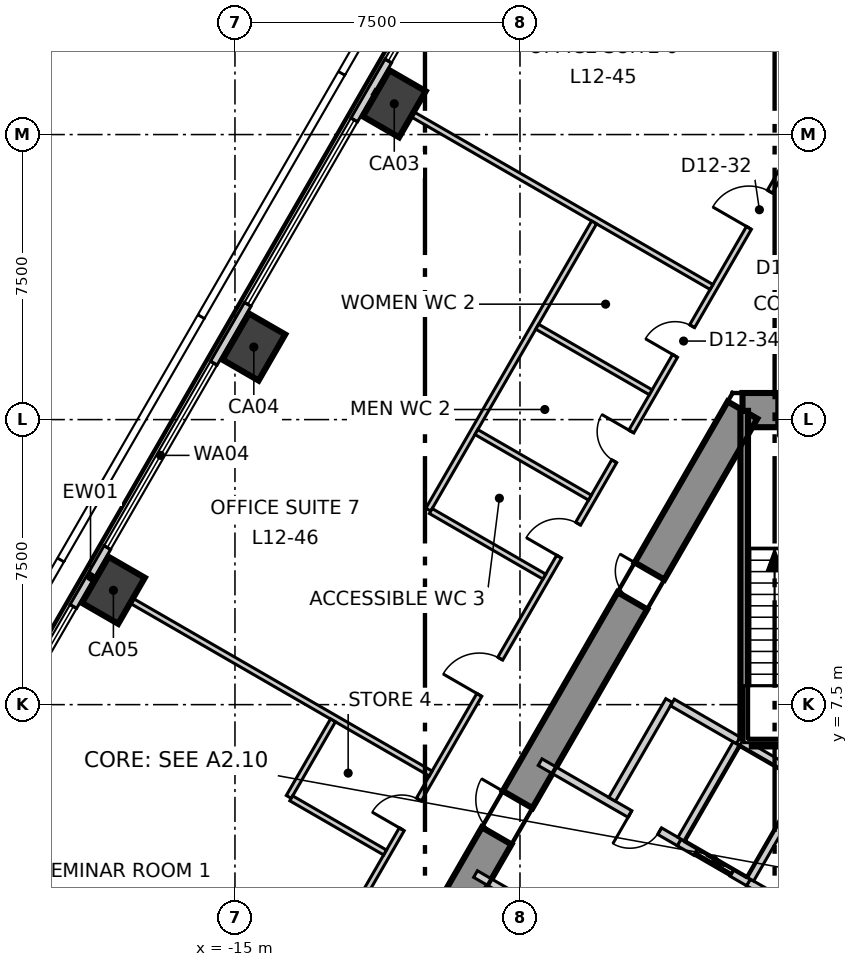
"""IFC4 building model, lengths in metres.
Left out: names, types, materials, properties, quantities, classifications, styles, units other than length and angle.
Written with IfcOpenShell. Run it as: python <this file> out.ifc"""

import sys

from ifc_helpers import new_model, si_unit, direction, frame, frame_2d, origin, origin_2d, place, context, subcontext, project, spatial, polyline, rectangle, outline, extrude, element, fill, save


model = new_model("IFC4")
c1 = context("Model", 3, precision=1e-05, world=origin(), true_north=direction((0.0, 1.0)))
c2 = subcontext(c1, "Body", "Model", "MODEL_VIEW")
j1 = project(units=[si_unit("LENGTHUNIT", "METRE"), si_unit("PLANEANGLEUNIT", "RADIAN")], contexts=[c1])
p1 = place(None, origin())
s1 = spatial("IfcSite", under=j1, at=p1, CompositionType="ELEMENT")
p2 = place(p1, origin())
s2 = spatial("IfcBuilding", under=s1, at=p2, CompositionType="ELEMENT")
p3 = place(p2, frame((0.0, 0.0, 59.3)))
s3 = spatial("IfcBuildingStorey", under=s2, at=p3, CompositionType="ELEMENT", Elevation=59.3)
p4 = place(p3, frame((1.645, 15.25, -0.3), z_axis=(0.0, 0.0, 1.0), x_axis=(-1.0, 0.0, 0.0)))
e1 = element("IfcWall", 1, at=p4, inside=s3, PredefinedType="SHEAR", context=c2, shape_type="SweptSolid", body=[
    extrude(outline(polyline([(-0.26, -0.45), (1.645, -0.45), (3.55, -0.45), (3.031, 0.45), (1.645, 0.45), (0.259, 0.45), (-0.26, -0.45)])), origin(), (0.0, 0.0, 1.0), 4.0),
])
p5 = place(p4, frame((0.945, 0.0, 0.3)))
e2 = element("IfcOpeningElement", 2, at=p5, cuts=e1, PredefinedType="OPENING", context=c2, shape_type="SweptSolid", body=[
    extrude(rectangle(XDim=1.4, YDim=2.1, at=frame_2d((0.7, 1.05))), frame((0.0, 0.46, 0.0), z_axis=(0.0, -1.0, 0.0), x_axis=(1.0, 0.0, 0.0)), (0.0, 0.0, 1.0), 0.92),
])
p6 = place(p3, frame((-1.645, 15.25, -0.3), z_axis=(0.0, 0.0, 1.0), x_axis=(-0.500026485275, -0.866010111964, 0.0)))
e3 = element("IfcWall", 3, at=p6, inside=s3, PredefinedType="SHEAR", context=c2, shape_type="SweptSolid", body=[
    extrude(outline(polyline([(-0.26, -0.45), (1.685, -0.45), (3.63, -0.45), (5.576, -0.45), (7.521, -0.45), (9.466, -0.449), (11.411, -0.449), (13.357, -0.449), (15.302, -0.449), (17.247, -0.449), (19.192, -0.449), (21.138, -0.449), (23.083, -0.449), (25.028, -0.449), (24.509, 0.45), (22.644, 0.45), (20.778, 0.45), (18.913, 0.45), (17.048, 0.45), (15.182, 0.449), (13.317, 0.449), (11.452, 0.449), (9.587, 0.449), (7.721, 0.449), (5.856, 0.449), (3.991, 0.449), (2.125, 0.449), (0.26, 0.449), (-0.26, -0.45)])), origin(), (0.0, 0.0, 1.0), 4.0),
])
p7 = place(p6, frame((11.834, 0.0, 0.3)))
e4 = element("IfcOpeningElement", 4, at=p7, cuts=e3, PredefinedType="OPENING", context=c2, shape_type="SweptSolid", body=[
    extrude(rectangle(XDim=1.1, YDim=2.1, at=frame_2d((0.55, 1.05))), frame((0.0, 0.46, 0.0), z_axis=(0.0, -1.0, 0.0), x_axis=(1.0, 0.0, 0.0)), (0.0, 0.0, 1.0), 0.92),
])
p8 = place(p6, frame((18.976, 0.0, 0.3)))
e5 = element("IfcOpeningElement", 5, at=p8, cuts=e3, PredefinedType="OPENING", context=c2, shape_type="SweptSolid", body=[
    extrude(rectangle(XDim=0.9, YDim=2.1, at=frame_2d((0.45, 1.05))), frame((0.0, 0.46, 0.0), z_axis=(0.0, -1.0, 0.0), x_axis=(1.0, 0.0, 0.0)), (0.0, 0.0, 1.0), 0.92),
])
p9 = place(p6, frame((4.892, 0.0, 0.3)))
e6 = element("IfcOpeningElement", 6, at=p9, cuts=e3, PredefinedType="OPENING", context=c2, shape_type="SweptSolid", body=[
    extrude(rectangle(XDim=0.9, YDim=2.1, at=frame_2d((0.45, 1.05))), frame((0.0, 0.46, 0.0), z_axis=(0.0, -1.0, 0.0), x_axis=(1.0, 0.0, 0.0)), (0.0, 0.0, 1.0), 0.92),
])
for number, where, z_axis, x_axis in (
    (7, (-10.808, 23.31, -0.3), (0.0, 0.0, 1.0), (0.5, 0.866, 0.0)),
    (8, (-14.504, 16.909, -0.3), (0.0, 0.0, 1.0), (0.5, 0.866, 0.0)),
    (9, (-18.199, 10.508, -0.3), (0.0, 0.0, 1.0), (0.5, 0.866, 0.0)),
):
    element("IfcColumn", number, at=place(p3, frame(where, z_axis=z_axis, x_axis=x_axis)), inside=s3, PredefinedType="COLUMN", context=c2, shape_type="SweptSolid", body=[
        extrude(rectangle(XDim=1.4, YDim=1.1, at=origin_2d()), origin(), (0.0, 0.0, 1.0), 4.0),
    ])
p10 = place(p3, frame((-3.371, 37.591, 0.0), z_axis=(0.0, 0.0, 1.0), x_axis=(-0.500006313899, -0.866021758423, 0.0)))
e10 = element("IfcWall", 10, at=p10, inside=s3, PredefinedType="ELEMENTEDWALL", context=c2, shape_type="SweptSolid", body=[
    extrude(rectangle(XDim=61.719, YDim=0.2, at=frame_2d((30.859, 0.0))), origin(), (0.0, 0.0, 1.0), 3.7),
])
p11 = place(p10, frame((2.198, 0.0, 0.9)))
e11 = element("IfcOpeningElement", 11, at=p11, cuts=e10, PredefinedType="OPENING", context=c2, shape_type="SweptSolid", body=[
    extrude(rectangle(XDim=5.6, YDim=2.5, at=frame_2d((2.8, 1.25))), frame((0.0, 0.11, 0.0), z_axis=(0.0, -1.0, 0.0), x_axis=(1.0, 0.0, 0.0)), (0.0, 0.0, 1.0), 0.22),
])
p12 = place(p10, frame((9.59, 0.0, 0.9)))
e12 = element("IfcOpeningElement", 12, at=p12, cuts=e10, PredefinedType="OPENING", context=c2, shape_type="SweptSolid", body=[
    extrude(rectangle(XDim=5.6, YDim=2.5, at=frame_2d((2.8, 1.25))), frame((0.0, 0.11, 0.0), z_axis=(0.0, -1.0, 0.0), x_axis=(1.0, 0.0, 0.0)), (0.0, 0.0, 1.0), 0.22),
])
p13 = place(p10, frame((16.982, 0.0, 0.9)))
e13 = element("IfcOpeningElement", 13, at=p13, cuts=e10, PredefinedType="OPENING", context=c2, shape_type="SweptSolid", body=[
    extrude(rectangle(XDim=5.6, YDim=2.5, at=frame_2d((2.8, 1.25))), frame((0.0, 0.11, 0.0), z_axis=(0.0, -1.0, 0.0), x_axis=(1.0, 0.0, 0.0)), (0.0, 0.0, 1.0), 0.22),
])
p14 = place(p10, frame((24.373, 0.0, 0.9)))
e14 = element("IfcOpeningElement", 14, at=p14, cuts=e10, PredefinedType="OPENING", context=c2, shape_type="SweptSolid", body=[
    extrude(rectangle(XDim=5.6, YDim=2.5, at=frame_2d((2.8, 1.25))), frame((0.0, 0.11, 0.0), z_axis=(0.0, -1.0, 0.0), x_axis=(1.0, 0.0, 0.0)), (0.0, 0.0, 1.0), 0.22),
])
p15 = place(p10, frame((31.765, 0.0, 0.9)))
e15 = element("IfcOpeningElement", 15, at=p15, cuts=e10, PredefinedType="OPENING", context=c2, shape_type="SweptSolid", body=[
    extrude(rectangle(XDim=5.6, YDim=2.5, at=frame_2d((2.8, 1.25))), frame((0.0, 0.11, 0.0), z_axis=(0.0, -1.0, 0.0), x_axis=(1.0, 0.0, 0.0)), (0.0, 0.0, 1.0), 0.22),
])
p16 = place(p10, frame((39.157, 0.0, 0.9)))
e16 = element("IfcOpeningElement", 16, at=p16, cuts=e10, PredefinedType="OPENING", context=c2, shape_type="SweptSolid", body=[
    extrude(rectangle(XDim=5.6, YDim=2.5, at=frame_2d((2.8, 1.25))), frame((0.0, 0.11, 0.0), z_axis=(0.0, -1.0, 0.0), x_axis=(1.0, 0.0, 0.0)), (0.0, 0.0, 1.0), 0.22),
])
p17 = place(p10, frame((46.548, 0.0, 0.9)))
e17 = element("IfcOpeningElement", 17, at=p17, cuts=e10, PredefinedType="OPENING", context=c2, shape_type="SweptSolid", body=[
    extrude(rectangle(XDim=5.6, YDim=2.5, at=frame_2d((2.8, 1.25))), frame((0.0, 0.11, 0.0), z_axis=(0.0, -1.0, 0.0), x_axis=(1.0, 0.0, 0.0)), (0.0, 0.0, 1.0), 0.22),
])
p18 = place(p10, frame((53.94, 0.0, 0.9)))
e18 = element("IfcOpeningElement", 18, at=p18, cuts=e10, PredefinedType="OPENING", context=c2, shape_type="SweptSolid", body=[
    extrude(rectangle(XDim=5.6, YDim=2.5, at=frame_2d((2.8, 1.25))), frame((0.0, 0.11, 0.0), z_axis=(0.0, -1.0, 0.0), x_axis=(1.0, 0.0, 0.0)), (0.0, 0.0, 1.0), 0.22),
])
p19 = place(p3, frame((-19.497, -11.17, 0.0), z_axis=(0.0, 0.0, 1.0), x_axis=(0.499998854553, 0.866026065108, 0.0)))
e19 = element("IfcWall", 19, at=p19, inside=s3, PredefinedType="PARTITIONING", context=c2, shape_type="SweptSolid", body=[
    extrude(rectangle(XDim=38.994, YDim=0.15, at=frame_2d((19.497, 0.0))), origin(), (0.0, 0.0, 1.0), 3.7),
])
p20 = place(p19, frame((36.044, 0.0, 0.0)))
e20 = element("IfcOpeningElement", 20, at=p20, cuts=e19, PredefinedType="OPENING", context=c2, shape_type="SweptSolid", body=[
    extrude(rectangle(XDim=1.1, YDim=2.1, at=frame_2d((0.55, 1.05))), frame((0.0, 0.085, 0.0), z_axis=(0.0, -1.0, 0.0), x_axis=(1.0, 0.0, 0.0)), (0.0, 0.0, 1.0), 0.17),
])
p21 = place(p19, frame((21.855, 0.0, 0.0)))
e21 = element("IfcOpeningElement", 21, at=p21, cuts=e19, PredefinedType="OPENING", context=c2, shape_type="SweptSolid", body=[
    extrude(rectangle(XDim=1.1, YDim=2.1, at=frame_2d((0.55, 1.05))), frame((0.0, 0.085, 0.0), z_axis=(0.0, -1.0, 0.0), x_axis=(1.0, 0.0, 0.0)), (0.0, 0.0, 1.0), 0.17),
])
p22 = place(p19, frame((32.155, 0.0, 0.0)))
e22 = element("IfcOpeningElement", 22, at=p22, cuts=e19, PredefinedType="OPENING", context=c2, shape_type="SweptSolid", body=[
    extrude(rectangle(XDim=0.9, YDim=2.1, at=frame_2d((0.45, 1.05))), frame((0.0, 0.085, 0.0), z_axis=(0.0, -1.0, 0.0), x_axis=(1.0, 0.0, 0.0)), (0.0, 0.0, 1.0), 0.17),
])
p23 = place(p19, frame((28.955, 0.0, 0.0)))
e23 = element("IfcOpeningElement", 23, at=p23, cuts=e19, PredefinedType="OPENING", context=c2, shape_type="SweptSolid", body=[
    extrude(rectangle(XDim=0.9, YDim=2.1, at=frame_2d((0.45, 1.05))), frame((0.0, 0.085, 0.0), z_axis=(0.0, -1.0, 0.0), x_axis=(1.0, 0.0, 0.0)), (0.0, 0.0, 1.0), 0.17),
])
p24 = place(p19, frame((26.055, 0.0, 0.0)))
e24 = element("IfcOpeningElement", 24, at=p24, cuts=e19, PredefinedType="OPENING", context=c2, shape_type="SweptSolid", body=[
    extrude(rectangle(XDim=1.0, YDim=2.1, at=frame_2d((0.5, 1.05))), frame((0.0, 0.085, 0.0), z_axis=(0.0, -1.0, 0.0), x_axis=(1.0, 0.0, 0.0)), (0.0, 0.0, 1.0), 0.17),
])
p25 = place(p19, frame((10.373, 0.0, 0.0)))
e25 = element("IfcOpeningElement", 25, at=p25, cuts=e19, PredefinedType="OPENING", context=c2, shape_type="SweptSolid", body=[
    extrude(rectangle(XDim=1.0, YDim=2.1, at=frame_2d((0.5, 1.05))), frame((0.0, 0.085, 0.0), z_axis=(0.0, -1.0, 0.0), x_axis=(1.0, 0.0, 0.0)), (0.0, 0.0, 1.0), 0.17),
])
p26 = place(p19, frame((17.773, 0.0, 0.0)))
e26 = element("IfcOpeningElement", 26, at=p26, cuts=e19, PredefinedType="OPENING", context=c2, shape_type="SweptSolid", body=[
    extrude(rectangle(XDim=0.9, YDim=2.1, at=frame_2d((0.45, 1.05))), frame((0.0, 0.085, 0.0), z_axis=(0.0, -1.0, 0.0), x_axis=(1.0, 0.0, 0.0)), (0.0, 0.0, 1.0), 0.17),
])
p27 = place(p19, frame((1.689, 0.0, 0.0)))
e27 = element("IfcOpeningElement", 27, at=p27, cuts=e19, PredefinedType="OPENING", context=c2, shape_type="SweptSolid", body=[
    extrude(rectangle(XDim=1.1, YDim=2.1, at=frame_2d((0.55, 1.05))), frame((0.0, 0.085, 0.0), z_axis=(0.0, -1.0, 0.0), x_axis=(1.0, 0.0, 0.0)), (0.0, 0.0, 1.0), 0.17),
])
p28 = place(p3, frame((-18.736, 10.818, 0.0), z_axis=(0.0, 0.0, 1.0), x_axis=(0.866010033384, -0.500026621369, 0.0)))
e28 = element("IfcWall", 28, at=p28, inside=s3, PredefinedType="PARTITIONING", context=c2, shape_type="SweptSolid", body=[
    extrude(rectangle(XDim=10.26, YDim=0.15, at=frame_2d((5.13, 0.0))), origin(), (0.0, 0.0, 1.0), 3.2),
])
p29 = place(p3, frame((-13.584, 5.072, 0.0), z_axis=(0.0, 0.0, 1.0), x_axis=(0.500113184874, 0.865960046605, 0.0)))
e29 = element("IfcWall", 29, at=p29, inside=s3, PredefinedType="PARTITIONING", context=c2, shape_type="SweptSolid", body=[
    extrude(rectangle(XDim=2.326, YDim=0.15, at=frame_2d((1.163, 0.0))), origin(), (0.0, 0.0, 1.0), 3.7),
])
p30 = place(p3, frame((-13.519, 5.035, 0.0), z_axis=(0.0, 0.0, 1.0), x_axis=(0.866041498374, -0.499972122318, 0.0)))
e30 = element("IfcWall", 30, at=p30, inside=s3, PredefinedType="PARTITIONING", context=c2, shape_type="SweptSolid", body=[
    extrude(rectangle(XDim=2.85, YDim=0.15, at=frame_2d((1.425, 0.0))), origin(), (0.0, 0.0, 1.0), 3.7),
])
p31 = place(p3, frame((-11.345, 23.62, 0.0), z_axis=(0.0, 0.0, 1.0), x_axis=(0.866010033384, -0.500026621369, 0.0)))
e31 = element("IfcWall", 31, at=p31, inside=s3, PredefinedType="PARTITIONING", context=c2, shape_type="SweptSolid", body=[
    extrude(rectangle(XDim=10.26, YDim=0.15, at=frame_2d((5.13, 0.0))), origin(), (0.0, 0.0, 1.0), 3.7),
])
p32 = place(p3, frame((-9.912, 12.631, 0.0), z_axis=(0.0, 0.0, 1.0), x_axis=(0.49992187278, 0.866070505857, 0.0)))
e32 = element("IfcWall", 32, at=p32, inside=s3, PredefinedType="PARTITIONING", context=c2, shape_type="SweptSolid", body=[
    extrude(rectangle(XDim=8.726, YDim=0.15, at=frame_2d((4.363, 0.0))), origin(), (0.0, 0.0, 1.0), 3.7),
])
p33 = place(p3, frame((-9.847, 12.594, 0.0), z_axis=(0.0, 0.0, 1.0), x_axis=(0.865942736565, -0.500143156496, 0.0)))
e33 = element("IfcWall", 33, at=p33, inside=s3, PredefinedType="PARTITIONING", context=c2, shape_type="SweptSolid", body=[
    extrude(rectangle(XDim=3.449, YDim=0.15, at=frame_2d((1.725, 0.0))), origin(), (0.0, 0.0, 1.0), 3.7),
])
for number, where, z_axis, x_axis in (
    (34, (-8.647, 14.672, 0.0), (0.0, 0.0, 1.0), (0.866, -0.5, 0.0)),
    (35, (-7.047, 17.444, 0.0), (0.0, 0.0, 1.0), (0.866, -0.5, 0.0)),
):
    element("IfcWall", number, at=place(p3, frame(where, z_axis=z_axis, x_axis=x_axis)), inside=s3, PredefinedType="PARTITIONING", context=c2, shape_type="SweptSolid", body=[
        extrude(rectangle(XDim=3.449, YDim=0.15, at=frame_2d((1.725, 0.0))), origin(), (0.0, 0.0, 1.0), 3.7),
    ])
p34 = place(p3, frame((-8.67, 3.043, 0.0), z_axis=(0.0, 0.0, 1.0), x_axis=(0.866029956157, -0.499992114976, 0.0)))
e36 = element("IfcWall", 36, at=p34, inside=s3, PredefinedType="SOLIDWALL", context=c2, shape_type="SweptSolid", body=[
    extrude(rectangle(XDim=4.232, YDim=0.2, at=frame_2d((2.116, 0.0))), origin(), (0.0, 0.0, 1.0), 3.7),
])
p35 = place(p34, frame((2.63, 0.0, 0.0)))
e37 = element("IfcOpeningElement", 37, at=p35, cuts=e36, PredefinedType="OPENING", context=c2, shape_type="SweptSolid", body=[
    extrude(rectangle(XDim=1.1, YDim=2.1, at=frame_2d((0.55, 1.05))), frame((0.0, 0.11, 0.0), z_axis=(0.0, -1.0, 0.0), x_axis=(1.0, 0.0, 0.0)), (0.0, 0.0, 1.0), 0.22),
])
p36 = place(p3, frame((-6.97, 5.987, 0.0), z_axis=(0.0, 0.0, 1.0), x_axis=(0.866029956157, -0.499992114976, 0.0)))
e38 = element("IfcWall", 38, at=p36, inside=s3, PredefinedType="SOLIDWALL", context=c2, shape_type="SweptSolid", body=[
    extrude(rectangle(XDim=4.232, YDim=0.2, at=frame_2d((2.116, 0.0))), origin(), (0.0, 0.0, 1.0), 3.7),
])
p37 = place(p36, frame((2.73, 0.0, 0.0)))
e39 = element("IfcOpeningElement", 39, at=p37, cuts=e38, PredefinedType="OPENING", context=c2, shape_type="SweptSolid", body=[
    extrude(rectangle(XDim=0.9, YDim=2.1, at=frame_2d((0.45, 1.05))), frame((0.0, 0.11, 0.0), z_axis=(0.0, -1.0, 0.0), x_axis=(1.0, 0.0, 0.0)), (0.0, 0.0, 1.0), 0.22),
])
p38 = place(p3, frame((-1.488, 2.822, 0.0), z_axis=(0.0, 0.0, 1.0), x_axis=(0.866236612152, -0.499633997809, 0.0)))
e40 = element("IfcWall", 40, at=p38, inside=s3, PredefinedType="SOLIDWALL", context=c2, shape_type="SweptSolid", body=[
    extrude(rectangle(XDim=0.796, YDim=0.2, at=frame_2d((0.398, 0.0))), origin(), (0.0, 0.0, 1.0), 3.7),
])
p39 = place(p3, frame((-5.076, 5.009, 0.0), z_axis=(0.0, 0.0, 1.0), x_axis=(0.50002537861, 0.866010750942, 0.0)))
e41 = element("IfcWall", 41, at=p39, inside=s3, PredefinedType="SOLIDWALL", context=c2, shape_type="SweptSolid", body=[
    extrude(rectangle(XDim=3.0, YDim=0.2, at=frame_2d((1.5, 0.0))), origin(), (0.0, 0.0, 1.0), 3.7),
])
p40 = place(p3, frame((-3.489, 7.557, 0.0), z_axis=(0.0, 0.0, 1.0), x_axis=(0.866010750942, -0.50002537861, 0.0)))
e42 = element("IfcWall", 42, at=p40, inside=s3, PredefinedType="SOLIDWALL", context=c2, shape_type="SweptSolid", body=[
    extrude(rectangle(XDim=2.0, YDim=0.2, at=frame_2d((1.0, 0.0))), origin(), (0.0, 0.0, 1.0), 3.7),
])
p41 = place(p3, frame((-3.309, 3.873, 0.0), z_axis=(0.0, 0.0, 1.0), x_axis=(0.866098583652, -0.499873227325, 0.0)))
e43 = element("IfcWall", 43, at=p41, inside=s3, PredefinedType="SOLIDWALL", context=c2, shape_type="SweptSolid", body=[
    extrude(rectangle(XDim=2.103, YDim=0.2, at=frame_2d((1.051, 0.0))), origin(), (0.0, 0.0, 1.0), 3.7),
])
p42 = place(p41, frame((0.502, 0.0, 0.0)))
e44 = element("IfcOpeningElement", 44, at=p42, cuts=e43, PredefinedType="OPENING", context=c2, shape_type="SweptSolid", body=[
    extrude(rectangle(XDim=1.1, YDim=2.1, at=frame_2d((0.55, 1.05))), frame((0.0, 0.11, 0.0), z_axis=(0.0, -1.0, 0.0), x_axis=(1.0, 0.0, 0.0)), (0.0, 0.0, 1.0), 0.22),
])
p43 = place(p3, frame((-3.257, 3.959, 0.0), z_axis=(0.0, 0.0, 1.0), x_axis=(0.50012328804, 0.865954211699, 0.0)))
e45 = element("IfcWall", 45, at=p43, inside=s3, PredefinedType="SOLIDWALL", context=c2, shape_type="SweptSolid", body=[
    extrude(rectangle(XDim=2.9, YDim=0.2, at=frame_2d((1.45, 0.0))), origin(), (0.0, 0.0, 1.0), 3.7),
])
p44 = place(p3, frame((-1.67, 6.507, 0.0), z_axis=(0.0, 0.0, 1.0), x_axis=(0.865941441609, -0.500145398563, 0.0)))
e46 = element("IfcWall", 46, at=p44, inside=s3, PredefinedType="SOLIDWALL", context=c2, shape_type="SweptSolid", body=[
    extrude(rectangle(XDim=1.815, YDim=0.2, at=frame_2d((0.908, 0.0))), origin(), (0.0, 0.0, 1.0), 3.7),
])
p45 = place(p3, frame((-1.438, 2.909, 0.0), z_axis=(0.0, 0.0, 1.0), x_axis=(0.499829630636, 0.866123744241, 0.0)))
e47 = element("IfcWall", 47, at=p45, inside=s3, PredefinedType="SOLIDWALL", context=c2, shape_type="SweptSolid", body=[
    extrude(rectangle(XDim=2.761, YDim=0.2, at=frame_2d((1.38, 0.0))), origin(), (0.0, 0.0, 1.0), 3.7),
])
p46 = place(p3, frame((-1.4, 6.5, 0.0), z_axis=(0.0, 0.0, 1.0), x_axis=(1.0, 0.0, 0.0)))
e48 = element("IfcWall", 48, at=p46, inside=s3, PredefinedType="SOLIDWALL", context=c2, shape_type="SweptSolid", body=[
    extrude(rectangle(XDim=2.8, YDim=0.2, at=frame_2d((1.4, 0.0))), origin(), (0.0, 0.0, 1.0), 3.7),
])
p47 = place(p3, frame((-1.6, 6.615, 0.0), z_axis=(0.0, 0.0, 1.0), x_axis=(0.0, 1.0, 0.0)))
e49 = element("IfcWall", 49, at=p47, inside=s3, PredefinedType="SOLIDWALL", context=c2, shape_type="SweptSolid", body=[
    extrude(rectangle(XDim=8.615, YDim=0.2, at=frame_2d((4.308, 0.0))), origin(), (0.0, 0.0, 1.0), 3.7),
])
p48 = place(p12, origin())
e50 = element("IfcWindow", 50, at=p48, inside=s3, PartitioningType="SINGLE_PANEL", PredefinedType="WINDOW", context=c2, shape_type="SweptSolid", body=[
    extrude(rectangle(XDim=5.6, YDim=2.5, at=frame_2d((2.8, 1.25))), frame((0.0, 0.03, 0.0), z_axis=(0.0, -1.0, 0.0), x_axis=(1.0, 0.0, 0.0)), (0.0, 0.0, 1.0), 0.06),
])
fill(e12, e50)
p49 = place(p13, origin())
e51 = element("IfcWindow", 51, at=p49, inside=s3, PartitioningType="SINGLE_PANEL", PredefinedType="WINDOW", context=c2, shape_type="SweptSolid", body=[
    extrude(rectangle(XDim=5.6, YDim=2.5, at=frame_2d((2.8, 1.25))), frame((0.0, 0.03, 0.0), z_axis=(0.0, -1.0, 0.0), x_axis=(1.0, 0.0, 0.0)), (0.0, 0.0, 1.0), 0.06),
])
fill(e13, e51)
p50 = place(p14, origin())
e52 = element("IfcWindow", 52, at=p50, inside=s3, PartitioningType="SINGLE_PANEL", PredefinedType="WINDOW", context=c2, shape_type="SweptSolid", body=[
    extrude(rectangle(XDim=5.6, YDim=2.5, at=frame_2d((2.8, 1.25))), frame((0.0, 0.03, 0.0), z_axis=(0.0, -1.0, 0.0), x_axis=(1.0, 0.0, 0.0)), (0.0, 0.0, 1.0), 0.06),
])
fill(e14, e52)
p51 = place(p15, origin())
e53 = element("IfcWindow", 53, at=p51, inside=s3, PartitioningType="SINGLE_PANEL", PredefinedType="WINDOW", context=c2, shape_type="SweptSolid", body=[
    extrude(rectangle(XDim=5.6, YDim=2.5, at=frame_2d((2.8, 1.25))), frame((0.0, 0.03, 0.0), z_axis=(0.0, -1.0, 0.0), x_axis=(1.0, 0.0, 0.0)), (0.0, 0.0, 1.0), 0.06),
])
fill(e15, e53)
p52 = place(p42, origin())
e54 = element("IfcDoor", 54, at=p52, inside=s3, OperationType="SLIDING_TO_LEFT", PredefinedType="DOOR", context=c2, shape_type="SweptSolid", body=[
    extrude(rectangle(XDim=1.1, YDim=2.1, at=frame_2d((0.55, 1.05))), frame((0.0, 0.025, 0.0), z_axis=(0.0, -1.0, 0.0), x_axis=(1.0, 0.0, 0.0)), (0.0, 0.0, 1.0), 0.05),
])
fill(e44, e54)
p53 = place(p37, origin())
e55 = element("IfcDoor", 55, at=p53, inside=s3, OperationType="SINGLE_SWING_LEFT", PredefinedType="DOOR", context=c2, shape_type="SweptSolid", body=[
    extrude(rectangle(XDim=0.9, YDim=2.1, at=frame_2d((0.45, 1.05))), frame((0.0, 0.025, 0.0), z_axis=(0.0, -1.0, 0.0), x_axis=(1.0, 0.0, 0.0)), (0.0, 0.0, 1.0), 0.05),
])
fill(e39, e55)
p54 = place(p20, origin())
e56 = element("IfcDoor", 56, at=p54, inside=s3, OperationType="SINGLE_SWING_RIGHT", PredefinedType="DOOR", context=c2, shape_type="SweptSolid", body=[
    extrude(rectangle(XDim=1.1, YDim=2.1, at=frame_2d((0.55, 1.05))), frame((0.0, 0.025, 0.0), z_axis=(0.0, -1.0, 0.0), x_axis=(1.0, 0.0, 0.0)), (0.0, 0.0, 1.0), 0.05),
])
fill(e20, e56)
p55 = place(p21, origin())
e57 = element("IfcDoor", 57, at=p55, inside=s3, OperationType="SINGLE_SWING_RIGHT", PredefinedType="DOOR", context=c2, shape_type="SweptSolid", body=[
    extrude(rectangle(XDim=1.1, YDim=2.1, at=frame_2d((0.55, 1.05))), frame((0.0, 0.025, 0.0), z_axis=(0.0, -1.0, 0.0), x_axis=(1.0, 0.0, 0.0)), (0.0, 0.0, 1.0), 0.05),
])
fill(e21, e57)
p56 = place(p22, origin())
e58 = element("IfcDoor", 58, at=p56, inside=s3, OperationType="SINGLE_SWING_RIGHT", PredefinedType="DOOR", context=c2, shape_type="SweptSolid", body=[
    extrude(rectangle(XDim=0.9, YDim=2.1, at=frame_2d((0.45, 1.05))), frame((0.0, 0.025, 0.0), z_axis=(0.0, -1.0, 0.0), x_axis=(1.0, 0.0, 0.0)), (0.0, 0.0, 1.0), 0.05),
])
fill(e22, e58)
p57 = place(p23, origin())
e59 = element("IfcDoor", 59, at=p57, inside=s3, OperationType="SINGLE_SWING_LEFT", PredefinedType="DOOR", context=c2, shape_type="SweptSolid", body=[
    extrude(rectangle(XDim=0.9, YDim=2.1, at=frame_2d((0.45, 1.05))), frame((0.0, 0.025, 0.0), z_axis=(0.0, -1.0, 0.0), x_axis=(1.0, 0.0, 0.0)), (0.0, 0.0, 1.0), 0.05),
])
fill(e23, e59)
p58 = place(p24, origin())
e60 = element("IfcDoor", 60, at=p58, inside=s3, OperationType="SINGLE_SWING_RIGHT", PredefinedType="DOOR", context=c2, shape_type="SweptSolid", body=[
    extrude(rectangle(XDim=1.0, YDim=2.1, at=frame_2d((0.5, 1.05))), frame((0.0, 0.025, 0.0), z_axis=(0.0, -1.0, 0.0), x_axis=(1.0, 0.0, 0.0)), (0.0, 0.0, 1.0), 0.05),
])
fill(e24, e60)
p59 = place(p26, origin())
e61 = element("IfcDoor", 61, at=p59, inside=s3, OperationType="SINGLE_SWING_RIGHT", PredefinedType="DOOR", context=c2, shape_type="SweptSolid", body=[
    extrude(rectangle(XDim=0.9, YDim=2.1, at=frame_2d((0.45, 1.05))), frame((0.0, 0.025, 0.0), z_axis=(0.0, -1.0, 0.0), x_axis=(1.0, 0.0, 0.0)), (0.0, 0.0, 1.0), 0.05),
])
fill(e26, e61)
p60 = place(p7, origin())
e62 = element("IfcDoor", 62, at=p60, inside=s3, OperationType="SINGLE_SWING_LEFT", PredefinedType="DOOR", context=c2, shape_type="SweptSolid", body=[
    extrude(rectangle(XDim=1.1, YDim=2.1, at=frame_2d((0.55, 1.05))), frame((0.0, 0.025, 0.0), z_axis=(0.0, -1.0, 0.0), x_axis=(1.0, 0.0, 0.0)), (0.0, 0.0, 1.0), 0.05),
])
fill(e4, e62)
p61 = place(p9, origin())
e63 = element("IfcDoor", 63, at=p61, inside=s3, OperationType="SINGLE_SWING_LEFT", PredefinedType="DOOR", context=c2, shape_type="SweptSolid", body=[
    extrude(rectangle(XDim=0.9, YDim=2.1, at=frame_2d((0.45, 1.05))), frame((0.0, 0.025, 0.0), z_axis=(0.0, -1.0, 0.0), x_axis=(1.0, 0.0, 0.0)), (0.0, 0.0, 1.0), 0.05),
])
fill(e6, e63)
save(model, sys.argv[1])
